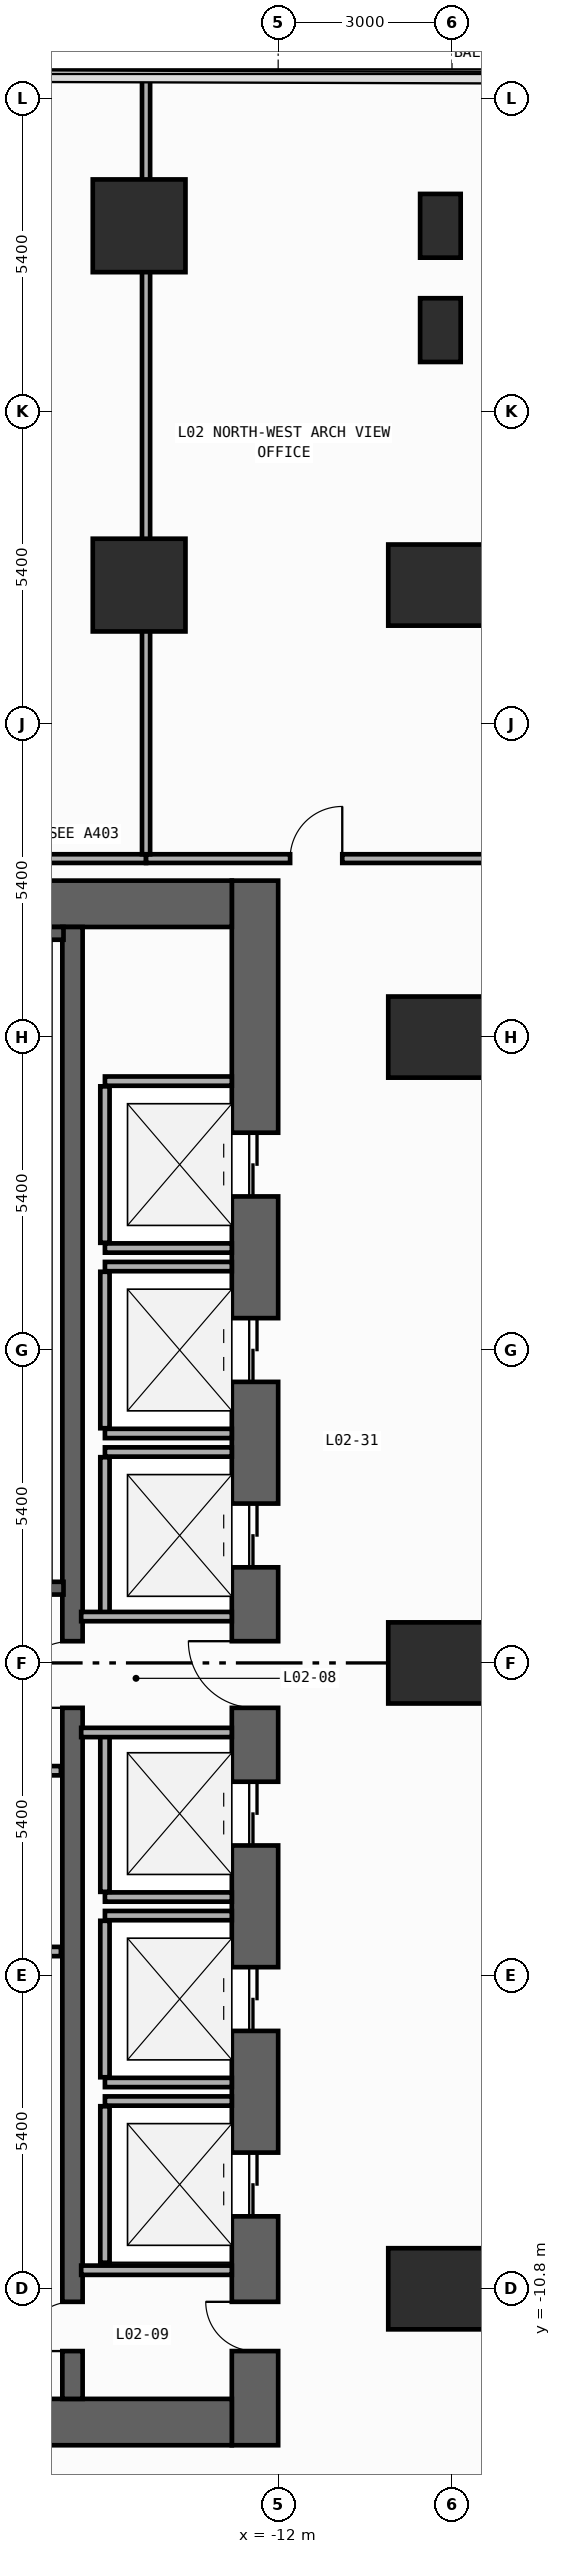
"""IFC4 building model, lengths in metres.
Left out: names, types, materials, properties, quantities, classifications, styles, units other than length and angle.
Written with IfcOpenShell. Run it as: python <this file> out.ifc"""

import sys

from ifc_helpers import new_model, si_unit, direction, frame, frame_2d, origin, origin_2d, place, context, subcontext, project, spatial, rectangle, extrude, element, fill, save


model = new_model("IFC4")
c1 = context("Model", 3, precision=1e-05, world=origin(), true_north=direction((0.0, 1.0)))
c2 = subcontext(c1, "Body", "Model", "MODEL_VIEW")
j1 = project(units=[si_unit("LENGTHUNIT", "METRE"), si_unit("PLANEANGLEUNIT", "RADIAN")], contexts=[c1])
p1 = place(None, origin())
s1 = spatial("IfcSite", under=j1, at=p1, CompositionType="ELEMENT")
p2 = place(p1, origin())
s2 = spatial("IfcBuilding", under=s1, at=p2, CompositionType="ELEMENT")
p3 = place(p2, frame((0.0, 0.0, 6.0)))
s3 = spatial("IfcBuildingStorey", under=s2, at=p3, CompositionType="ELEMENT", Elevation=6.0)
p4 = place(p3, frame((-12.4, -13.5, 0.0), z_axis=(0.0, 0.0, 1.0), x_axis=(0.0, 1.0, 0.0)))
e1 = element("IfcWall", 1, at=p4, inside=s3, PredefinedType="SHEAR", context=c2, shape_type="SweptSolid", body=[
    extrude(rectangle(XDim=27.0, YDim=0.8, at=frame_2d((13.5, 0.0))), origin(), (0.0, 0.0, 1.0), 4.7),
])
p5 = place(p4, frame((21.55, 0.0, 0.0)))
e2 = element("IfcOpeningElement", 2, at=p5, cuts=e1, PredefinedType="OPENING", context=c2, shape_type="SweptSolid", body=[
    extrude(rectangle(XDim=1.1, YDim=2.2, at=frame_2d((0.55, 1.1))), frame((0.0, 0.41, 0.0), z_axis=(0.0, -1.0, 0.0), x_axis=(1.0, 0.0, 0.0)), (0.0, 0.0, 1.0), 0.82),
])
p6 = place(p4, frame((18.35, 0.0, 0.0)))
e3 = element("IfcOpeningElement", 3, at=p6, cuts=e1, PredefinedType="OPENING", context=c2, shape_type="SweptSolid", body=[
    extrude(rectangle(XDim=1.1, YDim=2.2, at=frame_2d((0.55, 1.1))), frame((0.0, 0.41, 0.0), z_axis=(0.0, -1.0, 0.0), x_axis=(1.0, 0.0, 0.0)), (0.0, 0.0, 1.0), 0.82),
])
p7 = place(p4, frame((15.15, 0.0, 0.0)))
e4 = element("IfcOpeningElement", 4, at=p7, cuts=e1, PredefinedType="OPENING", context=c2, shape_type="SweptSolid", body=[
    extrude(rectangle(XDim=1.1, YDim=2.2, at=frame_2d((0.55, 1.1))), frame((0.0, 0.41, 0.0), z_axis=(0.0, -1.0, 0.0), x_axis=(1.0, 0.0, 0.0)), (0.0, 0.0, 1.0), 0.82),
])
p8 = place(p4, frame((10.35, 0.0, 0.0)))
e5 = element("IfcOpeningElement", 5, at=p8, cuts=e1, PredefinedType="OPENING", context=c2, shape_type="SweptSolid", body=[
    extrude(rectangle(XDim=1.1, YDim=2.2, at=frame_2d((0.55, 1.1))), frame((0.0, 0.41, 0.0), z_axis=(0.0, -1.0, 0.0), x_axis=(1.0, 0.0, 0.0)), (0.0, 0.0, 1.0), 0.82),
])
p9 = place(p4, frame((7.15, 0.0, 0.0)))
e6 = element("IfcOpeningElement", 6, at=p9, cuts=e1, PredefinedType="OPENING", context=c2, shape_type="SweptSolid", body=[
    extrude(rectangle(XDim=1.1, YDim=2.2, at=frame_2d((0.55, 1.1))), frame((0.0, 0.41, 0.0), z_axis=(0.0, -1.0, 0.0), x_axis=(1.0, 0.0, 0.0)), (0.0, 0.0, 1.0), 0.82),
])
p10 = place(p4, frame((3.95, 0.0, 0.0)))
e7 = element("IfcOpeningElement", 7, at=p10, cuts=e1, PredefinedType="OPENING", context=c2, shape_type="SweptSolid", body=[
    extrude(rectangle(XDim=1.1, YDim=2.2, at=frame_2d((0.55, 1.1))), frame((0.0, 0.41, 0.0), z_axis=(0.0, -1.0, 0.0), x_axis=(1.0, 0.0, 0.0)), (0.0, 0.0, 1.0), 0.82),
])
p11 = place(p4, frame((12.725, 0.0, 0.0)))
e8 = element("IfcOpeningElement", 8, at=p11, cuts=e1, PredefinedType="OPENING", context=c2, shape_type="SweptSolid", body=[
    extrude(rectangle(XDim=1.15, YDim=2.2, at=frame_2d((0.575, 1.1))), frame((0.0, 0.41, 0.0), z_axis=(0.0, -1.0, 0.0), x_axis=(1.0, 0.0, 0.0)), (0.0, 0.0, 1.0), 0.82),
])
p12 = place(p4, frame((1.625, 0.0, 0.0)))
e9 = element("IfcOpeningElement", 9, at=p12, cuts=e1, PredefinedType="OPENING", context=c2, shape_type="SweptSolid", body=[
    extrude(rectangle(XDim=0.85, YDim=2.1, at=frame_2d((0.425, 1.05))), frame((0.0, 0.41, 0.0), z_axis=(0.0, -1.0, 0.0), x_axis=(1.0, 0.0, 0.0)), (0.0, 0.0, 1.0), 0.82),
])
for number, where, z_axis, x_axis in (
    (10, (-19.6, -13.1, 0.0), (0.0, 0.0, 1.0), (1.0, 0.0, 0.0)),
    (11, (-19.6, 13.1, 0.0), (0.0, 0.0, 1.0), (1.0, 0.0, 0.0)),
):
    element("IfcWall", number, at=place(p3, frame(where, z_axis=z_axis, x_axis=x_axis)), inside=s3, PredefinedType="SHEAR", context=c2, shape_type="SweptSolid", body=[
        extrude(rectangle(XDim=6.8, YDim=0.8, at=frame_2d((3.4, 0.0))), origin(), (0.0, 0.0, 1.0), 4.7),
    ])
p13 = place(p3, frame((-15.55, -12.7, 0.0), z_axis=(0.0, 0.0, 1.0), x_axis=(0.0, 1.0, 0.0)))
e12 = element("IfcWall", 12, at=p13, inside=s3, PredefinedType="SHEAR", context=c2, shape_type="SweptSolid", body=[
    extrude(rectangle(XDim=25.4, YDim=0.35, at=frame_2d((12.7, 0.0))), origin(), (0.0, 0.0, 1.0), 4.7),
])
p14 = place(p13, frame((11.925, 0.0, 0.0)))
e13 = element("IfcOpeningElement", 13, at=p14, cuts=e12, PredefinedType="OPENING", context=c2, shape_type="SweptSolid", body=[
    extrude(rectangle(XDim=1.15, YDim=2.2, at=frame_2d((0.575, 1.1))), frame((0.0, 0.185, 0.0), z_axis=(0.0, -1.0, 0.0), x_axis=(1.0, 0.0, 0.0)), (0.0, 0.0, 1.0), 0.37),
])
p15 = place(p13, frame((0.825, 0.0, 0.0)))
e14 = element("IfcOpeningElement", 14, at=p15, cuts=e12, PredefinedType="OPENING", context=c2, shape_type="SweptSolid", body=[
    extrude(rectangle(XDim=0.85, YDim=2.1, at=frame_2d((0.425, 1.05))), frame((0.0, 0.185, 0.0), z_axis=(0.0, -1.0, 0.0), x_axis=(1.0, 0.0, 0.0)), (0.0, 0.0, 1.0), 0.37),
])
p16 = place(p3, frame((-19.62, 12.59, 0.0), z_axis=(0.0, 0.0, 1.0), x_axis=(1.0, 0.0, 0.0)))
e15 = element("IfcWall", 15, at=p16, inside=s3, PredefinedType="SHEAR", context=c2, shape_type="SweptSolid", body=[
    extrude(rectangle(XDim=3.915, YDim=0.22, at=frame_2d((1.958, 0.0))), origin(), (0.0, 0.0, 1.0), 4.7),
])
p17 = place(p3, frame((-19.62, 1.29, 0.0), z_axis=(0.0, 0.0, 1.0), x_axis=(1.0, 0.0, 0.0)))
e16 = element("IfcWall", 16, at=p17, inside=s3, PredefinedType="SHEAR", context=c2, shape_type="SweptSolid", body=[
    extrude(rectangle(XDim=3.915, YDim=0.22, at=frame_2d((1.958, 0.0))), origin(), (0.0, 0.0, 1.0), 4.7),
])
p18 = place(p17, frame((1.08, 0.0, 0.0)))
e17 = element("IfcOpeningElement", 17, at=p18, cuts=e16, PredefinedType="OPENING", context=c2, shape_type="SweptSolid", body=[
    extrude(rectangle(XDim=1.1, YDim=2.2, at=frame_2d((0.55, 1.1))), frame((0.0, 0.12, 0.0), z_axis=(0.0, -1.0, 0.0), x_axis=(1.0, 0.0, 0.0)), (0.0, 0.0, 1.0), 0.24),
])
for number, where, z_axis, x_axis in (
    (18, (-9.2, -10.8, 0.0), (0.0, 0.0, 1.0), (1.0, 0.0, 0.0)),
    (19, (-9.2, 0.0, 0.0), (0.0, 0.0, 1.0), (1.0, 0.0, 0.0)),
    (20, (-9.2, 10.8, 0.0), (0.0, 0.0, 1.0), (1.0, 0.0, 0.0)),
    (21, (-9.2, 18.6, 0.0), (0.0, 0.0, 1.0), (1.0, 0.0, 0.0)),
):
    element("IfcColumn", number, at=place(p3, frame(where, z_axis=z_axis, x_axis=x_axis)), inside=s3, PredefinedType="COLUMN", context=c2, shape_type="SweptSolid", body=[
        extrude(rectangle(XDim=1.8, YDim=1.4, at=origin_2d()), origin(), (0.0, 0.0, 1.0), 5.0),
    ])
p19 = place(p3, frame((-14.4, 18.6, 0.0), z_axis=(0.0, 0.0, 1.0), x_axis=(1.0, 0.0, 0.0)))
e22 = element("IfcColumn", 22, at=p19, inside=s3, PredefinedType="COLUMN", context=c2, shape_type="SweptSolid", body=[
    extrude(rectangle(XDim=1.6, YDim=1.6, at=origin_2d()), origin(), (0.0, 0.0, 1.0), 5.0),
])
p20 = place(p3, frame((-9.2, 24.8, 0.0), z_axis=(0.0, 0.0, 1.0), x_axis=(1.0, 0.0, 0.0)))
e23 = element("IfcColumn", 23, at=p20, inside=s3, PredefinedType="PILASTER", context=c2, shape_type="SweptSolid", body=[
    extrude(rectangle(XDim=0.7, YDim=1.1, at=origin_2d()), origin(), (0.0, 0.0, 1.0), 5.0),
])
p21 = place(p3, frame((-14.4, 24.8, 0.0), z_axis=(0.0, 0.0, 1.0), x_axis=(1.0, 0.0, 0.0)))
e24 = element("IfcColumn", 24, at=p21, inside=s3, PredefinedType="COLUMN", context=c2, shape_type="SweptSolid", body=[
    extrude(rectangle(XDim=1.6, YDim=1.6, at=origin_2d()), origin(), (0.0, 0.0, 1.0), 5.0),
])
p22 = place(p3, frame((-9.2, 23.0, 0.0), z_axis=(0.0, 0.0, 1.0), x_axis=(1.0, 0.0, 0.0)))
e25 = element("IfcColumn", 25, at=p22, inside=s3, PredefinedType="PILASTER", context=c2, shape_type="SweptSolid", body=[
    extrude(rectangle(XDim=0.7, YDim=1.1, at=origin_2d()), origin(), (0.0, 0.0, 1.0), 5.0),
])
for number, where, z_axis, x_axis in (
    (26, (-14.99, 7.16, 0.0), (0.0, 0.0, 1.0), (1.0, 0.0, 0.0)),
    (27, (-14.99, 10.04, 0.0), (0.0, 0.0, 1.0), (1.0, 0.0, 0.0)),
):
    element("IfcWall", number, at=place(p3, frame(where, z_axis=z_axis, x_axis=x_axis)), inside=s3, PredefinedType="STANDARD", context=c2, shape_type="SweptSolid", body=[
        extrude(rectangle(XDim=2.19, YDim=0.16, at=frame_2d((1.095, 0.0))), origin(), (0.0, 0.0, 1.0), 4.7),
    ])
p23 = place(p3, frame((-14.99, 7.25, 0.0), z_axis=(0.0, 0.0, 1.0), x_axis=(0.0, 1.0, 0.0)))
e28 = element("IfcWall", 28, at=p23, inside=s3, PredefinedType="STANDARD", context=c2, shape_type="SweptSolid", body=[
    extrude(rectangle(XDim=2.7, YDim=0.16, at=frame_2d((1.35, 0.0))), origin(), (0.0, 0.0, 1.0), 4.7),
])
for number, where, z_axis, x_axis in (
    (29, (-14.99, 3.96, 0.0), (0.0, 0.0, 1.0), (1.0, 0.0, 0.0)),
    (30, (-14.99, 6.84, 0.0), (0.0, 0.0, 1.0), (1.0, 0.0, 0.0)),
):
    element("IfcWall", number, at=place(p3, frame(where, z_axis=z_axis, x_axis=x_axis)), inside=s3, PredefinedType="STANDARD", context=c2, shape_type="SweptSolid", body=[
        extrude(rectangle(XDim=2.19, YDim=0.16, at=frame_2d((1.095, 0.0))), origin(), (0.0, 0.0, 1.0), 4.7),
    ])
p24 = place(p3, frame((-14.99, 4.05, 0.0), z_axis=(0.0, 0.0, 1.0), x_axis=(0.0, 1.0, 0.0)))
e31 = element("IfcWall", 31, at=p24, inside=s3, PredefinedType="STANDARD", context=c2, shape_type="SweptSolid", body=[
    extrude(rectangle(XDim=2.7, YDim=0.16, at=frame_2d((1.35, 0.0))), origin(), (0.0, 0.0, 1.0), 4.7),
])
p25 = place(p3, frame((-14.99, 3.64, 0.0), z_axis=(0.0, 0.0, 1.0), x_axis=(1.0, 0.0, 0.0)))
e32 = element("IfcWall", 32, at=p25, inside=s3, PredefinedType="STANDARD", context=c2, shape_type="SweptSolid", body=[
    extrude(rectangle(XDim=2.19, YDim=0.16, at=frame_2d((1.095, 0.0))), origin(), (0.0, 0.0, 1.0), 4.7),
])
p26 = place(p3, frame((-14.99, 0.85, 0.0), z_axis=(0.0, 0.0, 1.0), x_axis=(0.0, 1.0, 0.0)))
e33 = element("IfcWall", 33, at=p26, inside=s3, PredefinedType="STANDARD", context=c2, shape_type="SweptSolid", body=[
    extrude(rectangle(XDim=2.7, YDim=0.16, at=frame_2d((1.35, 0.0))), origin(), (0.0, 0.0, 1.0), 4.7),
])
p27 = place(p3, frame((-14.99, -4.04, 0.0), z_axis=(0.0, 0.0, 1.0), x_axis=(1.0, 0.0, 0.0)))
e34 = element("IfcWall", 34, at=p27, inside=s3, PredefinedType="STANDARD", context=c2, shape_type="SweptSolid", body=[
    extrude(rectangle(XDim=2.19, YDim=0.16, at=frame_2d((1.095, 0.0))), origin(), (0.0, 0.0, 1.0), 4.7),
])
p28 = place(p3, frame((-14.99, -3.95, 0.0), z_axis=(0.0, 0.0, 1.0), x_axis=(0.0, 1.0, 0.0)))
e35 = element("IfcWall", 35, at=p28, inside=s3, PredefinedType="STANDARD", context=c2, shape_type="SweptSolid", body=[
    extrude(rectangle(XDim=2.7, YDim=0.16, at=frame_2d((1.35, 0.0))), origin(), (0.0, 0.0, 1.0), 4.7),
])
for number, where, z_axis, x_axis in (
    (36, (-14.99, -7.24, 0.0), (0.0, 0.0, 1.0), (1.0, 0.0, 0.0)),
    (37, (-14.99, -4.36, 0.0), (0.0, 0.0, 1.0), (1.0, 0.0, 0.0)),
):
    element("IfcWall", number, at=place(p3, frame(where, z_axis=z_axis, x_axis=x_axis)), inside=s3, PredefinedType="STANDARD", context=c2, shape_type="SweptSolid", body=[
        extrude(rectangle(XDim=2.19, YDim=0.16, at=frame_2d((1.095, 0.0))), origin(), (0.0, 0.0, 1.0), 4.7),
    ])
p29 = place(p3, frame((-14.99, -7.15, 0.0), z_axis=(0.0, 0.0, 1.0), x_axis=(0.0, 1.0, 0.0)))
e38 = element("IfcWall", 38, at=p29, inside=s3, PredefinedType="STANDARD", context=c2, shape_type="SweptSolid", body=[
    extrude(rectangle(XDim=2.7, YDim=0.16, at=frame_2d((1.35, 0.0))), origin(), (0.0, 0.0, 1.0), 4.7),
])
p30 = place(p3, frame((-14.99, -7.56, 0.0), z_axis=(0.0, 0.0, 1.0), x_axis=(1.0, 0.0, 0.0)))
e39 = element("IfcWall", 39, at=p30, inside=s3, PredefinedType="STANDARD", context=c2, shape_type="SweptSolid", body=[
    extrude(rectangle(XDim=2.19, YDim=0.16, at=frame_2d((1.095, 0.0))), origin(), (0.0, 0.0, 1.0), 4.7),
])
p31 = place(p3, frame((-14.99, -10.35, 0.0), z_axis=(0.0, 0.0, 1.0), x_axis=(0.0, 1.0, 0.0)))
e40 = element("IfcWall", 40, at=p31, inside=s3, PredefinedType="STANDARD", context=c2, shape_type="SweptSolid", body=[
    extrude(rectangle(XDim=2.7, YDim=0.16, at=frame_2d((1.35, 0.0))), origin(), (0.0, 0.0, 1.0), 4.7),
])
p32 = place(p3, frame((-19.55, -1.86, 0.0), z_axis=(0.0, 0.0, 1.0), x_axis=(1.0, 0.0, 0.0)))
e41 = element("IfcWall", 41, at=p32, inside=s3, PredefinedType="STANDARD", context=c2, shape_type="SweptSolid", body=[
    extrude(rectangle(XDim=3.8, YDim=0.16, at=frame_2d((1.9, 0.0))), origin(), (0.0, 0.0, 1.0), 4.7),
])
p33 = place(p32, frame((1.18, 0.0, 0.0)))
e42 = element("IfcOpeningElement", 42, at=p33, cuts=e41, PredefinedType="OPENING", context=c2, shape_type="SweptSolid", body=[
    extrude(rectangle(XDim=1.15, YDim=2.2, at=frame_2d((0.575, 1.1))), frame((0.0, 0.09, 0.0), z_axis=(0.0, -1.0, 0.0), x_axis=(1.0, 0.0, 0.0)), (0.0, 0.0, 1.0), 0.18),
])
p34 = place(p3, frame((-19.55, -4.98, 0.0), z_axis=(0.0, 0.0, 1.0), x_axis=(1.0, 0.0, 0.0)))
e43 = element("IfcWall", 43, at=p34, inside=s3, PredefinedType="STANDARD", context=c2, shape_type="SweptSolid", body=[
    extrude(rectangle(XDim=3.8, YDim=0.16, at=frame_2d((1.9, 0.0))), origin(), (0.0, 0.0, 1.0), 4.7),
])
for number, where, z_axis, x_axis in (
    (44, (-15.4, 0.8, 0.0), (0.0, 0.0, 1.0), (1.0, 0.0, 0.0)),
    (45, (-15.4, -1.2, 0.0), (0.0, 0.0, 1.0), (1.0, 0.0, 0.0)),
    (46, (-15.4, -10.48, 0.0), (0.0, 0.0, 1.0), (1.0, 0.0, 0.0)),
):
    element("IfcWall", number, at=place(p3, frame(where, z_axis=z_axis, x_axis=x_axis)), inside=s3, PredefinedType="STANDARD", context=c2, shape_type="SweptSolid", body=[
        extrude(rectangle(XDim=2.6, YDim=0.16, at=frame_2d((1.3, 0.0))), origin(), (0.0, 0.0, 1.0), 4.7),
    ])
p35 = place(p3, frame((-24.445, 13.88, 0.0), z_axis=(0.0, 0.0, 1.0), x_axis=(1.0, 0.0, 0.0)))
e47 = element("IfcWall", 47, at=p35, inside=s3, PredefinedType="PARTITIONING", context=c2, shape_type="SweptSolid", body=[
    extrude(rectangle(XDim=10.165, YDim=0.15, at=frame_2d((5.083, 0.0))), origin(), (0.0, 0.0, 1.0), 4.7),
])
p36 = place(p35, frame((0.46, 0.0, 0.0)))
e48 = element("IfcOpeningElement", 48, at=p36, cuts=e47, PredefinedType="OPENING", context=c2, shape_type="SweptSolid", body=[
    extrude(rectangle(XDim=0.9, YDim=2.15, at=frame_2d((0.45, 1.075))), frame((0.0, 0.085, 0.0), z_axis=(0.0, -1.0, 0.0), x_axis=(1.0, 0.0, 0.0)), (0.0, 0.0, 1.0), 0.17),
])
p37 = place(p3, frame((-14.28, 13.88, 0.0), z_axis=(0.0, 0.0, 1.0), x_axis=(1.0, 0.0, 0.0)))
e49 = element("IfcWall", 49, at=p37, inside=s3, PredefinedType="PARTITIONING", context=c2, shape_type="SweptSolid", body=[
    extrude(rectangle(XDim=6.075, YDim=0.15, at=frame_2d((3.038, 0.0))), origin(), (0.0, 0.0, 1.0), 4.7),
])
p38 = place(p37, frame((2.486, 0.0, 0.0)))
e50 = element("IfcOpeningElement", 50, at=p38, cuts=e49, PredefinedType="OPENING", context=c2, shape_type="SweptSolid", body=[
    extrude(rectangle(XDim=0.9, YDim=2.15, at=frame_2d((0.45, 1.075))), frame((0.0, 0.085, 0.0), z_axis=(0.0, -1.0, 0.0), x_axis=(1.0, 0.0, 0.0)), (0.0, 0.0, 1.0), 0.17),
])
p39 = place(p3, frame((-14.28, 13.955, 0.0), z_axis=(0.0, 0.0, 1.0), x_axis=(0.0, 1.0, 0.0)))
e51 = element("IfcWall", 51, at=p39, inside=s3, PredefinedType="PARTITIONING", context=c2, shape_type="SweptSolid", body=[
    extrude(rectangle(XDim=13.425, YDim=0.14, at=frame_2d((6.713, 0.0))), origin(), (0.0, 0.0, 1.0), 3.8),
])
p40 = place(p5, origin())
e52 = element("IfcDoor", 52, at=p40, inside=s3, OperationType="DOUBLE_DOOR_SLIDING", PredefinedType="DOOR", context=c2, shape_type="SweptSolid", body=[
    extrude(rectangle(XDim=1.1, YDim=2.2, at=frame_2d((0.55, 1.1))), frame((0.0, 0.025, 0.0), z_axis=(0.0, -1.0, 0.0), x_axis=(1.0, 0.0, 0.0)), (0.0, 0.0, 1.0), 0.05),
])
fill(e2, e52)
p41 = place(p6, origin())
e53 = element("IfcDoor", 53, at=p41, inside=s3, OperationType="DOUBLE_DOOR_SLIDING", PredefinedType="DOOR", context=c2, shape_type="SweptSolid", body=[
    extrude(rectangle(XDim=1.1, YDim=2.2, at=frame_2d((0.55, 1.1))), frame((0.0, 0.025, 0.0), z_axis=(0.0, -1.0, 0.0), x_axis=(1.0, 0.0, 0.0)), (0.0, 0.0, 1.0), 0.05),
])
fill(e3, e53)
p42 = place(p7, origin())
e54 = element("IfcDoor", 54, at=p42, inside=s3, OperationType="DOUBLE_DOOR_SLIDING", PredefinedType="DOOR", context=c2, shape_type="SweptSolid", body=[
    extrude(rectangle(XDim=1.1, YDim=2.2, at=frame_2d((0.55, 1.1))), frame((0.0, 0.025, 0.0), z_axis=(0.0, -1.0, 0.0), x_axis=(1.0, 0.0, 0.0)), (0.0, 0.0, 1.0), 0.05),
])
fill(e4, e54)
p43 = place(p8, origin())
e55 = element("IfcDoor", 55, at=p43, inside=s3, OperationType="DOUBLE_DOOR_SLIDING", PredefinedType="DOOR", context=c2, shape_type="SweptSolid", body=[
    extrude(rectangle(XDim=1.1, YDim=2.2, at=frame_2d((0.55, 1.1))), frame((0.0, 0.025, 0.0), z_axis=(0.0, -1.0, 0.0), x_axis=(1.0, 0.0, 0.0)), (0.0, 0.0, 1.0), 0.05),
])
fill(e5, e55)
p44 = place(p9, origin())
e56 = element("IfcDoor", 56, at=p44, inside=s3, OperationType="DOUBLE_DOOR_SLIDING", PredefinedType="DOOR", context=c2, shape_type="SweptSolid", body=[
    extrude(rectangle(XDim=1.1, YDim=2.2, at=frame_2d((0.55, 1.1))), frame((0.0, 0.025, 0.0), z_axis=(0.0, -1.0, 0.0), x_axis=(1.0, 0.0, 0.0)), (0.0, 0.0, 1.0), 0.05),
])
fill(e6, e56)
p45 = place(p10, origin())
e57 = element("IfcDoor", 57, at=p45, inside=s3, OperationType="DOUBLE_DOOR_SLIDING", PredefinedType="DOOR", context=c2, shape_type="SweptSolid", body=[
    extrude(rectangle(XDim=1.1, YDim=2.2, at=frame_2d((0.55, 1.1))), frame((0.0, 0.025, 0.0), z_axis=(0.0, -1.0, 0.0), x_axis=(1.0, 0.0, 0.0)), (0.0, 0.0, 1.0), 0.05),
])
fill(e7, e57)
p46 = place(p11, origin())
e58 = element("IfcDoor", 58, at=p46, inside=s3, OperationType="SINGLE_SWING_RIGHT", PredefinedType="DOOR", context=c2, shape_type="SweptSolid", body=[
    extrude(rectangle(XDim=1.15, YDim=2.2, at=frame_2d((0.575, 1.1))), frame((0.0, 0.025, 0.0), z_axis=(0.0, -1.0, 0.0), x_axis=(1.0, 0.0, 0.0)), (0.0, 0.0, 1.0), 0.05),
])
fill(e8, e58)
p47 = place(p14, origin())
e59 = element("IfcDoor", 59, at=p47, inside=s3, OperationType="SINGLE_SWING_LEFT", PredefinedType="DOOR", context=c2, shape_type="SweptSolid", body=[
    extrude(rectangle(XDim=1.15, YDim=2.2, at=frame_2d((0.575, 1.1))), frame((0.0, 0.025, 0.0), z_axis=(0.0, -1.0, 0.0), x_axis=(1.0, 0.0, 0.0)), (0.0, 0.0, 1.0), 0.05),
])
fill(e13, e59)
p48 = place(p12, origin())
e60 = element("IfcDoor", 60, at=p48, inside=s3, OperationType="SINGLE_SWING_RIGHT", PredefinedType="DOOR", context=c2, shape_type="SweptSolid", body=[
    extrude(rectangle(XDim=0.85, YDim=2.1, at=frame_2d((0.425, 1.05))), frame((0.0, 0.025, 0.0), z_axis=(0.0, -1.0, 0.0), x_axis=(1.0, 0.0, 0.0)), (0.0, 0.0, 1.0), 0.05),
])
fill(e9, e60)
p49 = place(p15, origin())
e61 = element("IfcDoor", 61, at=p49, inside=s3, OperationType="SINGLE_SWING_LEFT", PredefinedType="DOOR", context=c2, shape_type="SweptSolid", body=[
    extrude(rectangle(XDim=0.85, YDim=2.1, at=frame_2d((0.425, 1.05))), frame((0.0, 0.025, 0.0), z_axis=(0.0, -1.0, 0.0), x_axis=(1.0, 0.0, 0.0)), (0.0, 0.0, 1.0), 0.05),
])
fill(e14, e61)
p50 = place(p38, origin())
e62 = element("IfcDoor", 62, at=p50, inside=s3, OperationType="SINGLE_SWING_RIGHT", PredefinedType="DOOR", context=c2, shape_type="SweptSolid", body=[
    extrude(rectangle(XDim=0.9, YDim=2.15, at=frame_2d((0.45, 1.075))), frame((0.0, 0.025, 0.0), z_axis=(0.0, -1.0, 0.0), x_axis=(1.0, 0.0, 0.0)), (0.0, 0.0, 1.0), 0.05),
])
fill(e50, e62)
save(model, sys.argv[1])
